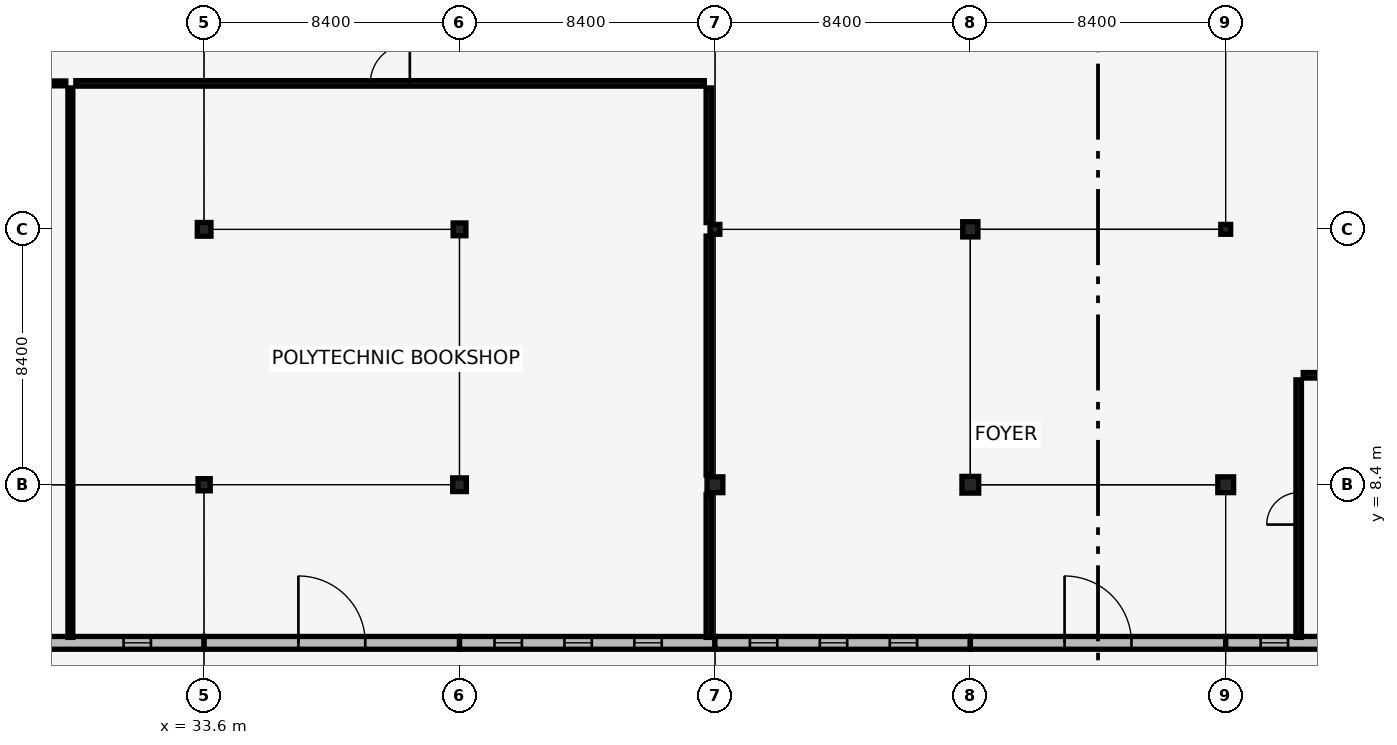
"""IFC4 building model, lengths in metres.
Left out: names, types, materials, properties, quantities, classifications, styles, units other than length and angle.
Written with IfcOpenShell. Run it as: python <this file> out.ifc"""

import sys

from ifc_helpers import new_model, si_unit, direction, frame, frame_2d, origin, origin_2d, place, context, subcontext, project, spatial, rectangle, hollow_circle, extrude, element, fill, save


model = new_model("IFC4")
c1 = context("Model", 3, precision=1e-05, world=origin(), true_north=direction((0.0, 1.0)))
c2 = subcontext(c1, "Body", "Model", "MODEL_VIEW")
j1 = project(units=[si_unit("LENGTHUNIT", "METRE"), si_unit("PLANEANGLEUNIT", "RADIAN")], contexts=[c1])
p1 = place(None, origin())
s1 = spatial("IfcSite", under=j1, at=p1, CompositionType="ELEMENT")
p2 = place(p1, origin())
s2 = spatial("IfcBuilding", under=s1, at=p2, CompositionType="ELEMENT")
p3 = place(p2, origin())
s3 = spatial("IfcBuildingStorey", under=s2, at=p3, CompositionType="ELEMENT", Elevation=0.0)
p4 = place(p3, frame((33.6, 8.4, -0.32), z_axis=(0.0, 0.0, 1.0), x_axis=(1.0, 0.0, 0.0)))
e1 = element("IfcColumn", 1, at=p4, inside=s3, PredefinedType="COLUMN", context=c2, shape_type="SweptSolid", body=[
    extrude(rectangle(XDim=0.4, YDim=0.4, at=origin_2d()), origin(), (0.0, 0.0, 1.0), 5.46),
])
for number, where, z_axis, x_axis in (
    (2, (33.6, 16.8, -0.32), (0.0, 0.0, 1.0), (1.0, 0.0, 0.0)),
    (3, (42.0, 8.4, -0.32), (0.0, 0.0, 1.0), (1.0, 0.0, 0.0)),
):
    element("IfcColumn", number, at=place(p3, frame(where, z_axis=z_axis, x_axis=x_axis)), inside=s3, PredefinedType="COLUMN", context=c2, shape_type="SweptSolid", body=[
        extrude(rectangle(XDim=0.45, YDim=0.45, at=origin_2d()), origin(), (0.0, 0.0, 1.0), 5.46),
    ])
p5 = place(p3, frame((42.0, 16.8, -0.32), z_axis=(0.0, 0.0, 1.0), x_axis=(1.0, 0.0, 0.0)))
e4 = element("IfcColumn", 4, at=p5, inside=s3, PredefinedType="COLUMN", context=c2, shape_type="SweptSolid", body=[
    extrude(rectangle(XDim=0.42, YDim=0.42, at=origin_2d()), origin(), (0.0, 0.0, 1.0), 5.46),
])
p6 = place(p3, frame((50.4, 8.4, 0.0), z_axis=(0.0, 0.0, 1.0), x_axis=(1.0, 0.0, 0.0)))
e5 = element("IfcColumn", 5, at=p6, inside=s3, PredefinedType="COLUMN", context=c2, shape_type="SweptSolid", body=[
    extrude(rectangle(XDim=0.52, YDim=0.52, at=origin_2d()), origin(), (0.0, 0.0, 1.0), 5.14),
])
p7 = place(p3, frame((50.4, 16.8, 0.0), z_axis=(0.0, 0.0, 1.0), x_axis=(1.0, 0.0, 0.0)))
e6 = element("IfcColumn", 6, at=p7, inside=s3, PredefinedType="COLUMN", context=c2, shape_type="SweptSolid", body=[
    extrude(hollow_circle(Radius=0.162, WallThickness=0.016, at=origin_2d()), origin(), (0.0, 0.0, 1.0), 5.14),
])
p8 = place(p3, frame((58.8, 8.4, 0.0), z_axis=(0.0, 0.0, 1.0), x_axis=(1.0, 0.0, 0.0)))
e7 = element("IfcColumn", 7, at=p8, inside=s3, PredefinedType="COLUMN", context=c2, shape_type="SweptSolid", body=[
    extrude(rectangle(XDim=0.55, YDim=0.55, at=origin_2d()), origin(), (0.0, 0.0, 1.0), 5.14),
])
p9 = place(p3, frame((58.8, 16.8, 0.0), z_axis=(0.0, 0.0, 1.0), x_axis=(1.0, 0.0, 0.0)))
e8 = element("IfcColumn", 8, at=p9, inside=s3, PredefinedType="COLUMN", context=c2, shape_type="SweptSolid", body=[
    extrude(rectangle(XDim=0.5, YDim=0.5, at=origin_2d()), origin(), (0.0, 0.0, 1.0), 5.14),
])
p10 = place(p3, frame((67.2, 8.4, 0.0), z_axis=(0.0, 0.0, 1.0), x_axis=(1.0, 0.0, 0.0)))
e9 = element("IfcColumn", 9, at=p10, inside=s3, PredefinedType="COLUMN", context=c2, shape_type="SweptSolid", body=[
    extrude(rectangle(XDim=0.52, YDim=0.52, at=origin_2d()), origin(), (0.0, 0.0, 1.0), 5.14),
])
p11 = place(p3, frame((67.2, 16.8, 0.0), z_axis=(0.0, 0.0, 1.0), x_axis=(1.0, 0.0, 0.0)))
e10 = element("IfcColumn", 10, at=p11, inside=s3, PredefinedType="COLUMN", context=c2, shape_type="SweptSolid", body=[
    extrude(hollow_circle(Radius=0.162, WallThickness=0.016, at=origin_2d()), origin(), (0.0, 0.0, 1.0), 5.14),
])
p12 = place(p3, frame((25.2, 3.2, 0.0), z_axis=(0.0, 0.0, 1.0), x_axis=(1.0, 0.0, 0.0)))
e11 = element("IfcWall", 11, at=p12, inside=s3, PredefinedType="SOLIDWALL", context=c2, shape_type="SweptSolid", body=[
    extrude(rectangle(XDim=8.4, YDim=0.42, at=frame_2d((4.2, 0.0))), origin(), (0.0, 0.0, 1.0), 4.49),
])
p13 = place(p12, frame((1.15, 0.0, 0.85)))
e12 = element("IfcOpeningElement", 12, at=p13, cuts=e11, PredefinedType="OPENING", context=c2, shape_type="SweptSolid", body=[
    extrude(rectangle(XDim=0.9, YDim=3.0, at=frame_2d((0.45, 1.5))), frame((0.0, 0.22, 0.0), z_axis=(0.0, -1.0, 0.0), x_axis=(1.0, 0.0, 0.0)), (0.0, 0.0, 1.0), 0.44),
])
p14 = place(p12, frame((5.75, 0.0, 0.85)))
e13 = element("IfcOpeningElement", 13, at=p14, cuts=e11, PredefinedType="OPENING", context=c2, shape_type="SweptSolid", body=[
    extrude(rectangle(XDim=0.9, YDim=3.0, at=frame_2d((0.45, 1.5))), frame((0.0, 0.22, 0.0), z_axis=(0.0, -1.0, 0.0), x_axis=(1.0, 0.0, 0.0)), (0.0, 0.0, 1.0), 0.44),
])
p15 = place(p3, frame((33.6, 3.2, 0.0), z_axis=(0.0, 0.0, 1.0), x_axis=(1.0, 0.0, 0.0)))
e14 = element("IfcWall", 14, at=p15, inside=s3, PredefinedType="SOLIDWALL", context=c2, shape_type="SweptSolid", body=[
    extrude(rectangle(XDim=8.4, YDim=0.42, at=frame_2d((4.2, 0.0))), origin(), (0.0, 0.0, 1.0), 4.49),
])
p16 = place(p15, frame((3.1, 0.0, 0.0)))
e15 = element("IfcOpeningElement", 15, at=p16, cuts=e14, PredefinedType="OPENING", context=c2, shape_type="SweptSolid", body=[
    extrude(rectangle(XDim=2.2, YDim=2.4, at=frame_2d((1.1, 1.2))), frame((0.0, 0.22, 0.0), z_axis=(0.0, -1.0, 0.0), x_axis=(1.0, 0.0, 0.0)), (0.0, 0.0, 1.0), 0.44),
])
p17 = place(p3, frame((42.0, 3.2, 0.0), z_axis=(0.0, 0.0, 1.0), x_axis=(1.0, 0.0, 0.0)))
e16 = element("IfcWall", 16, at=p17, inside=s3, PredefinedType="SOLIDWALL", context=c2, shape_type="SweptSolid", body=[
    extrude(rectangle(XDim=8.4, YDim=0.42, at=frame_2d((4.2, 0.0))), origin(), (0.0, 0.0, 1.0), 4.74),
])
p18 = place(p17, frame((1.15, 0.0, 0.85)))
e17 = element("IfcOpeningElement", 17, at=p18, cuts=e16, PredefinedType="OPENING", context=c2, shape_type="SweptSolid", body=[
    extrude(rectangle(XDim=0.9, YDim=3.0, at=frame_2d((0.45, 1.5))), frame((0.0, 0.22, 0.0), z_axis=(0.0, -1.0, 0.0), x_axis=(1.0, 0.0, 0.0)), (0.0, 0.0, 1.0), 0.44),
])
p19 = place(p17, frame((3.45, 0.0, 0.85)))
e18 = element("IfcOpeningElement", 18, at=p19, cuts=e16, PredefinedType="OPENING", context=c2, shape_type="SweptSolid", body=[
    extrude(rectangle(XDim=0.9, YDim=3.0, at=frame_2d((0.45, 1.5))), frame((0.0, 0.22, 0.0), z_axis=(0.0, -1.0, 0.0), x_axis=(1.0, 0.0, 0.0)), (0.0, 0.0, 1.0), 0.44),
])
p20 = place(p17, frame((5.75, 0.0, 0.85)))
e19 = element("IfcOpeningElement", 19, at=p20, cuts=e16, PredefinedType="OPENING", context=c2, shape_type="SweptSolid", body=[
    extrude(rectangle(XDim=0.9, YDim=3.0, at=frame_2d((0.45, 1.5))), frame((0.0, 0.22, 0.0), z_axis=(0.0, -1.0, 0.0), x_axis=(1.0, 0.0, 0.0)), (0.0, 0.0, 1.0), 0.44),
])
p21 = place(p3, frame((50.4, 3.2, 0.0), z_axis=(0.0, 0.0, 1.0), x_axis=(1.0, 0.0, 0.0)))
e20 = element("IfcWall", 20, at=p21, inside=s3, PredefinedType="SOLIDWALL", context=c2, shape_type="SweptSolid", body=[
    extrude(rectangle(XDim=8.4, YDim=0.42, at=frame_2d((4.2, 0.0))), origin(), (0.0, 0.0, 1.0), 4.83),
])
p22 = place(p21, frame((1.15, 0.0, 0.85)))
e21 = element("IfcOpeningElement", 21, at=p22, cuts=e20, PredefinedType="OPENING", context=c2, shape_type="SweptSolid", body=[
    extrude(rectangle(XDim=0.9, YDim=3.0, at=frame_2d((0.45, 1.5))), frame((0.0, 0.22, 0.0), z_axis=(0.0, -1.0, 0.0), x_axis=(1.0, 0.0, 0.0)), (0.0, 0.0, 1.0), 0.44),
])
p23 = place(p21, frame((3.45, 0.0, 0.85)))
e22 = element("IfcOpeningElement", 22, at=p23, cuts=e20, PredefinedType="OPENING", context=c2, shape_type="SweptSolid", body=[
    extrude(rectangle(XDim=0.9, YDim=3.0, at=frame_2d((0.45, 1.5))), frame((0.0, 0.22, 0.0), z_axis=(0.0, -1.0, 0.0), x_axis=(1.0, 0.0, 0.0)), (0.0, 0.0, 1.0), 0.44),
])
p24 = place(p21, frame((5.75, 0.0, 0.85)))
e23 = element("IfcOpeningElement", 23, at=p24, cuts=e20, PredefinedType="OPENING", context=c2, shape_type="SweptSolid", body=[
    extrude(rectangle(XDim=0.9, YDim=3.0, at=frame_2d((0.45, 1.5))), frame((0.0, 0.22, 0.0), z_axis=(0.0, -1.0, 0.0), x_axis=(1.0, 0.0, 0.0)), (0.0, 0.0, 1.0), 0.44),
])
p25 = place(p3, frame((58.8, 3.2, 0.0), z_axis=(0.0, 0.0, 1.0), x_axis=(1.0, 0.0, 0.0)))
e24 = element("IfcWall", 24, at=p25, inside=s3, PredefinedType="SOLIDWALL", context=c2, shape_type="SweptSolid", body=[
    extrude(rectangle(XDim=8.4, YDim=0.42, at=frame_2d((4.2, 0.0))), origin(), (0.0, 0.0, 1.0), 5.14),
])
p26 = place(p25, frame((3.1, 0.0, 0.0)))
e25 = element("IfcOpeningElement", 25, at=p26, cuts=e24, PredefinedType="OPENING", context=c2, shape_type="SweptSolid", body=[
    extrude(rectangle(XDim=2.2, YDim=2.4, at=frame_2d((1.1, 1.2))), frame((0.0, 0.22, 0.0), z_axis=(0.0, -1.0, 0.0), x_axis=(1.0, 0.0, 0.0)), (0.0, 0.0, 1.0), 0.44),
])
p27 = place(p3, frame((67.2, 3.2, 0.0), z_axis=(0.0, 0.0, 1.0), x_axis=(1.0, 0.0, 0.0)))
e26 = element("IfcWall", 26, at=p27, inside=s3, PredefinedType="SOLIDWALL", context=c2, shape_type="SweptSolid", body=[
    extrude(rectangle(XDim=8.4, YDim=0.42, at=frame_2d((4.2, 0.0))), origin(), (0.0, 0.0, 1.0), 4.83),
])
p28 = place(p27, frame((1.15, 0.0, 0.85)))
e27 = element("IfcOpeningElement", 27, at=p28, cuts=e26, PredefinedType="OPENING", context=c2, shape_type="SweptSolid", body=[
    extrude(rectangle(XDim=0.9, YDim=3.0, at=frame_2d((0.45, 1.5))), frame((0.0, 0.22, 0.0), z_axis=(0.0, -1.0, 0.0), x_axis=(1.0, 0.0, 0.0)), (0.0, 0.0, 1.0), 0.44),
])
p29 = place(p27, frame((3.45, 0.0, 0.85)))
e28 = element("IfcOpeningElement", 28, at=p29, cuts=e26, PredefinedType="OPENING", context=c2, shape_type="SweptSolid", body=[
    extrude(rectangle(XDim=0.9, YDim=3.0, at=frame_2d((0.45, 1.5))), frame((0.0, 0.22, 0.0), z_axis=(0.0, -1.0, 0.0), x_axis=(1.0, 0.0, 0.0)), (0.0, 0.0, 1.0), 0.44),
])
p30 = place(p27, frame((5.75, 0.0, 0.85)))
e29 = element("IfcOpeningElement", 29, at=p30, cuts=e26, PredefinedType="OPENING", context=c2, shape_type="SweptSolid", body=[
    extrude(rectangle(XDim=0.9, YDim=3.0, at=frame_2d((0.45, 1.5))), frame((0.0, 0.22, 0.0), z_axis=(0.0, -1.0, 0.0), x_axis=(1.0, 0.0, 0.0)), (0.0, 0.0, 1.0), 0.44),
])
p31 = place(p3, frame((18.8, 21.6, 0.0), z_axis=(0.0, 0.0, 1.0), x_axis=(1.0, 0.0, 0.0)))
e30 = element("IfcWall", 30, at=p31, inside=s3, PredefinedType="PARTITIONING", context=c2, shape_type="SweptSolid", body=[
    extrude(rectangle(XDim=10.25, YDim=0.16, at=frame_2d((5.125, 0.0))), origin(), (0.0, 0.0, 1.0), 4.74),
])
p32 = place(p31, frame((4.475, 0.0, 0.0)))
e31 = element("IfcOpeningElement", 31, at=p32, cuts=e30, PredefinedType="OPENING", context=c2, shape_type="SweptSolid", body=[
    extrude(rectangle(XDim=1.3, YDim=2.2, at=frame_2d((0.65, 1.1))), frame((0.0, 0.09, 0.0), z_axis=(0.0, -1.0, 0.0), x_axis=(1.0, 0.0, 0.0)), (0.0, 0.0, 1.0), 0.18),
])
p33 = place(p3, frame((29.2, 3.38, 0.0), z_axis=(0.0, 0.0, 1.0), x_axis=(0.0, 1.0, 0.0)))
e32 = element("IfcWall", 32, at=p33, inside=s3, PredefinedType="PARTITIONING", context=c2, shape_type="SweptSolid", body=[
    extrude(rectangle(XDim=18.07, YDim=0.16, at=frame_2d((9.035, 0.0))), origin(), (0.0, 0.0, 1.0), 4.36),
])
p34 = place(p3, frame((29.38, 21.6, 0.0), z_axis=(0.0, 0.0, 1.0), x_axis=(1.0, 0.0, 0.0)))
e33 = element("IfcWall", 33, at=p34, inside=s3, PredefinedType="PARTITIONING", context=c2, shape_type="SweptSolid", body=[
    extrude(rectangle(XDim=20.67, YDim=0.18, at=frame_2d((10.335, 0.0))), origin(), (0.0, 0.0, 1.0), 4.49),
])
p35 = place(p34, frame((9.685, 0.0, 0.0)))
e34 = element("IfcOpeningElement", 34, at=p35, cuts=e33, PredefinedType="OPENING", context=c2, shape_type="SweptSolid", body=[
    extrude(rectangle(XDim=1.3, YDim=2.2, at=frame_2d((0.65, 1.1))), frame((0.0, 0.1, 0.0), z_axis=(0.0, -1.0, 0.0), x_axis=(1.0, 0.0, 0.0)), (0.0, 0.0, 1.0), 0.2),
])
p36 = place(p3, frame((50.2, 3.38, 0.0), z_axis=(0.0, 0.0, 1.0), x_axis=(0.0, 1.0, 0.0)))
e35 = element("IfcWall", 35, at=p36, inside=s3, PredefinedType="PARTITIONING", context=c2, shape_type="SweptSolid", body=[
    extrude(rectangle(XDim=4.7, YDim=0.18, at=frame_2d((2.35, 0.0))), origin(), (0.0, 0.0, 1.0), 4.39),
])
p37 = place(p3, frame((50.2, 8.72, 0.0), z_axis=(0.0, 0.0, 1.0), x_axis=(0.0, 1.0, 0.0)))
e36 = element("IfcWall", 36, at=p37, inside=s3, PredefinedType="PARTITIONING", context=c2, shape_type="SweptSolid", body=[
    extrude(rectangle(XDim=7.858, YDim=0.18, at=frame_2d((3.929, 0.0))), origin(), (0.0, 0.0, 1.0), 4.36),
])
p38 = place(p3, frame((50.2, 17.022, 0.0), z_axis=(0.0, 0.0, 1.0), x_axis=(0.0, 1.0, 0.0)))
e37 = element("IfcWall", 37, at=p38, inside=s3, PredefinedType="PARTITIONING", context=c2, shape_type="SweptSolid", body=[
    extrude(rectangle(XDim=4.428, YDim=0.18, at=frame_2d((2.214, 0.0))), origin(), (0.0, 0.0, 1.0), 4.36),
])
p39 = place(p3, frame((69.6, 3.38, 0.0), z_axis=(0.0, 0.0, 1.0), x_axis=(0.0, 1.0, 0.0)))
e38 = element("IfcWall", 38, at=p39, inside=s3, PredefinedType="PARTITIONING", context=c2, shape_type="SweptSolid", body=[
    extrude(rectangle(XDim=8.47, YDim=0.18, at=frame_2d((4.235, 0.0))), origin(), (0.0, 0.0, 1.0), 4.39),
])
p40 = place(p39, frame((3.71, 0.0, 0.0)))
e39 = element("IfcOpeningElement", 39, at=p40, cuts=e38, PredefinedType="OPENING", context=c2, shape_type="SweptSolid", body=[
    extrude(rectangle(XDim=1.05, YDim=2.15, at=frame_2d((0.525, 1.075))), frame((0.0, 0.1, 0.0), z_axis=(0.0, -1.0, 0.0), x_axis=(1.0, 0.0, 0.0)), (0.0, 0.0, 1.0), 0.2),
])
p41 = place(p3, frame((69.75, 12.0, 0.0), z_axis=(0.0, 0.0, 1.0), x_axis=(1.0, 0.0, 0.0)))
e40 = element("IfcWall", 40, at=p41, inside=s3, PredefinedType="PARTITIONING", context=c2, shape_type="SweptSolid", body=[
    extrude(rectangle(XDim=5.3, YDim=0.18, at=frame_2d((2.65, 0.0))), origin(), (0.0, 0.0, 1.0), 5.14),
])
p42 = place(p14, origin())
e41 = element("IfcWindow", 41, at=p42, inside=s3, PartitioningType="DOUBLE_PANEL_VERTICAL", PredefinedType="WINDOW", context=c2, shape_type="SweptSolid", body=[
    extrude(rectangle(XDim=0.9, YDim=3.0, at=frame_2d((0.45, 1.5))), frame((0.0, 0.03, 0.0), z_axis=(0.0, -1.0, 0.0), x_axis=(1.0, 0.0, 0.0)), (0.0, 0.0, 1.0), 0.06),
])
fill(e13, e41)
p43 = place(p16, origin())
e42 = element("IfcDoor", 42, at=p43, inside=s3, OperationType="DOUBLE_DOOR_SINGLE_SWING", PredefinedType="DOOR", context=c2, shape_type="SweptSolid", body=[
    extrude(rectangle(XDim=2.2, YDim=2.4, at=frame_2d((1.1, 1.2))), frame((0.0, 0.025, 0.0), z_axis=(0.0, -1.0, 0.0), x_axis=(1.0, 0.0, 0.0)), (0.0, 0.0, 1.0), 0.05),
])
fill(e15, e42)
p44 = place(p18, origin())
e43 = element("IfcWindow", 43, at=p44, inside=s3, PartitioningType="DOUBLE_PANEL_VERTICAL", PredefinedType="WINDOW", context=c2, shape_type="SweptSolid", body=[
    extrude(rectangle(XDim=0.9, YDim=3.0, at=frame_2d((0.45, 1.5))), frame((0.0, 0.03, 0.0), z_axis=(0.0, -1.0, 0.0), x_axis=(1.0, 0.0, 0.0)), (0.0, 0.0, 1.0), 0.06),
])
fill(e17, e43)
p45 = place(p19, origin())
e44 = element("IfcWindow", 44, at=p45, inside=s3, PartitioningType="DOUBLE_PANEL_VERTICAL", PredefinedType="WINDOW", context=c2, shape_type="SweptSolid", body=[
    extrude(rectangle(XDim=0.9, YDim=3.0, at=frame_2d((0.45, 1.5))), frame((0.0, 0.03, 0.0), z_axis=(0.0, -1.0, 0.0), x_axis=(1.0, 0.0, 0.0)), (0.0, 0.0, 1.0), 0.06),
])
fill(e18, e44)
p46 = place(p20, origin())
e45 = element("IfcWindow", 45, at=p46, inside=s3, PartitioningType="DOUBLE_PANEL_VERTICAL", PredefinedType="WINDOW", context=c2, shape_type="SweptSolid", body=[
    extrude(rectangle(XDim=0.9, YDim=3.0, at=frame_2d((0.45, 1.5))), frame((0.0, 0.03, 0.0), z_axis=(0.0, -1.0, 0.0), x_axis=(1.0, 0.0, 0.0)), (0.0, 0.0, 1.0), 0.06),
])
fill(e19, e45)
p47 = place(p22, origin())
e46 = element("IfcWindow", 46, at=p47, inside=s3, PartitioningType="DOUBLE_PANEL_VERTICAL", PredefinedType="WINDOW", context=c2, shape_type="SweptSolid", body=[
    extrude(rectangle(XDim=0.9, YDim=3.0, at=frame_2d((0.45, 1.5))), frame((0.0, 0.03, 0.0), z_axis=(0.0, -1.0, 0.0), x_axis=(1.0, 0.0, 0.0)), (0.0, 0.0, 1.0), 0.06),
])
fill(e21, e46)
p48 = place(p23, origin())
e47 = element("IfcWindow", 47, at=p48, inside=s3, PartitioningType="DOUBLE_PANEL_VERTICAL", PredefinedType="WINDOW", context=c2, shape_type="SweptSolid", body=[
    extrude(rectangle(XDim=0.9, YDim=3.0, at=frame_2d((0.45, 1.5))), frame((0.0, 0.03, 0.0), z_axis=(0.0, -1.0, 0.0), x_axis=(1.0, 0.0, 0.0)), (0.0, 0.0, 1.0), 0.06),
])
fill(e22, e47)
p49 = place(p24, origin())
e48 = element("IfcWindow", 48, at=p49, inside=s3, PartitioningType="DOUBLE_PANEL_VERTICAL", PredefinedType="WINDOW", context=c2, shape_type="SweptSolid", body=[
    extrude(rectangle(XDim=0.9, YDim=3.0, at=frame_2d((0.45, 1.5))), frame((0.0, 0.03, 0.0), z_axis=(0.0, -1.0, 0.0), x_axis=(1.0, 0.0, 0.0)), (0.0, 0.0, 1.0), 0.06),
])
fill(e23, e48)
p50 = place(p26, origin())
e49 = element("IfcDoor", 49, at=p50, inside=s3, OperationType="DOUBLE_DOOR_SINGLE_SWING", PredefinedType="DOOR", context=c2, shape_type="SweptSolid", body=[
    extrude(rectangle(XDim=2.2, YDim=2.4, at=frame_2d((1.1, 1.2))), frame((0.0, 0.025, 0.0), z_axis=(0.0, -1.0, 0.0), x_axis=(1.0, 0.0, 0.0)), (0.0, 0.0, 1.0), 0.05),
])
fill(e25, e49)
p51 = place(p28, origin())
e50 = element("IfcWindow", 50, at=p51, inside=s3, PartitioningType="DOUBLE_PANEL_VERTICAL", PredefinedType="WINDOW", context=c2, shape_type="SweptSolid", body=[
    extrude(rectangle(XDim=0.9, YDim=3.0, at=frame_2d((0.45, 1.5))), frame((0.0, 0.03, 0.0), z_axis=(0.0, -1.0, 0.0), x_axis=(1.0, 0.0, 0.0)), (0.0, 0.0, 1.0), 0.06),
])
fill(e27, e50)
p52 = place(p35, origin())
e51 = element("IfcDoor", 51, at=p52, inside=s3, OperationType="SINGLE_SWING_RIGHT", PredefinedType="DOOR", context=c2, shape_type="SweptSolid", body=[
    extrude(rectangle(XDim=1.3, YDim=2.2, at=frame_2d((0.65, 1.1))), frame((0.0, 0.025, 0.0), z_axis=(0.0, -1.0, 0.0), x_axis=(1.0, 0.0, 0.0)), (0.0, 0.0, 1.0), 0.05),
])
fill(e34, e51)
p53 = place(p40, origin())
e52 = element("IfcDoor", 52, at=p53, inside=s3, OperationType="SINGLE_SWING_LEFT", PredefinedType="DOOR", context=c2, shape_type="SweptSolid", body=[
    extrude(rectangle(XDim=1.05, YDim=2.15, at=frame_2d((0.525, 1.075))), frame((0.0, 0.025, 0.0), z_axis=(0.0, -1.0, 0.0), x_axis=(1.0, 0.0, 0.0)), (0.0, 0.0, 1.0), 0.05),
])
fill(e39, e52)
save(model, sys.argv[1])
